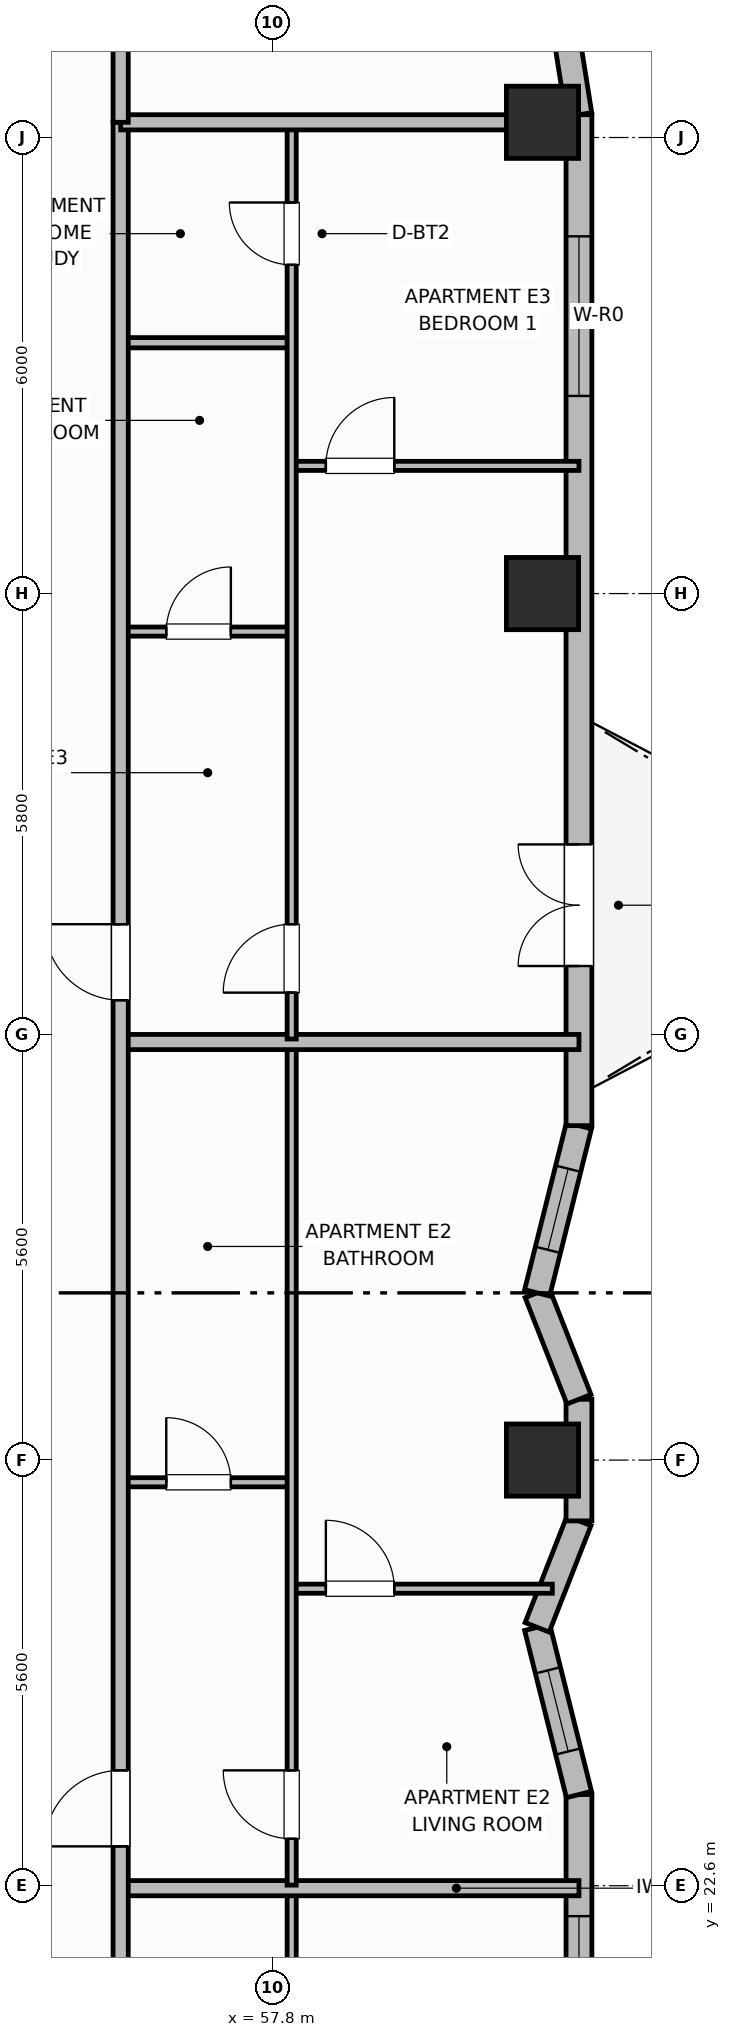
"""IFC4 building model, lengths in metres.
Left out: names, types, materials, properties, quantities, classifications, styles, units other than length and angle.
Written with IfcOpenShell. Run it as: python <this file> out.ifc"""

import sys

from ifc_helpers import new_model, si_unit, direction, frame, frame_2d, origin, origin_2d, place, context, subcontext, project, spatial, rectangle, extrude, element, fill, save


model = new_model("IFC4")
c1 = context("Model", 3, precision=1e-05, world=origin(), true_north=direction((0.0, 1.0)))
c2 = subcontext(c1, "Body", "Model", "MODEL_VIEW")
j1 = project(units=[si_unit("LENGTHUNIT", "METRE"), si_unit("PLANEANGLEUNIT", "RADIAN")], contexts=[c1])
p1 = place(None, origin())
s1 = spatial("IfcSite", under=j1, at=p1, CompositionType="ELEMENT")
p2 = place(p1, origin())
s2 = spatial("IfcBuilding", under=s1, at=p2, CompositionType="ELEMENT")
p3 = place(p2, frame((0.0, 0.0, 151.5)))
s3 = spatial("IfcBuildingStorey", under=s2, at=p3, CompositionType="ELEMENT", Elevation=151.5)
for number, where, z_axis, x_axis in (
    (1, (61.35, 28.2, 0.0), (0.0, 0.0, 1.0), (1.0, 0.0, 0.0)),
    (2, (61.35, 39.6, 0.0), (0.0, 0.0, 1.0), (1.0, 0.0, 0.0)),
    (3, (61.35, 45.8, 0.0), (0.0, 0.0, 1.0), (1.0, 0.0, 0.0)),
):
    element("IfcColumn", number, at=place(p3, frame(where, z_axis=z_axis, x_axis=x_axis)), inside=s3, PredefinedType="COLUMN", context=c2, shape_type="SweptSolid", body=[
        extrude(rectangle(XDim=0.95, YDim=0.95, at=origin_2d()), origin(), (0.0, 0.0, 1.0), 3.7),
    ])
p4 = place(p3, frame((61.83, 10.5, 0.0), z_axis=(0.0, 0.0, 1.0), x_axis=(0.0, 1.0, 0.0)))
e4 = element("IfcWall", 4, at=p4, inside=s3, PredefinedType="SOLIDWALL", context=c2, shape_type="SweptSolid", body=[
    extrude(rectangle(XDim=13.3, YDim=0.34, at=frame_2d((6.65, 0.0))), origin(), (0.0, 0.0, 1.0), 2.72),
])
p5 = place(p4, frame((1.6, 0.0, 0.95)))
e5 = element("IfcOpeningElement", 5, at=p5, cuts=e4, PredefinedType="OPENING", context=c2, shape_type="SweptSolid", body=[
    extrude(rectangle(XDim=1.1, YDim=1.65, at=frame_2d((0.55, 0.825))), frame((0.0, 0.18, 0.0), z_axis=(0.0, -1.0, 0.0), x_axis=(1.0, 0.0, 0.0)), (0.0, 0.0, 1.0), 0.36),
])
p6 = place(p4, frame((7.6, 0.0, 0.95)))
e6 = element("IfcOpeningElement", 6, at=p6, cuts=e4, PredefinedType="OPENING", context=c2, shape_type="SweptSolid", body=[
    extrude(rectangle(XDim=1.1, YDim=1.65, at=frame_2d((0.55, 0.825))), frame((0.0, 0.18, 0.0), z_axis=(0.0, -1.0, 0.0), x_axis=(1.0, 0.0, 0.0)), (0.0, 0.0, 1.0), 0.36),
])
p7 = place(p4, frame((10.6, 0.0, 0.95)))
e7 = element("IfcOpeningElement", 7, at=p7, cuts=e4, PredefinedType="OPENING", context=c2, shape_type="SweptSolid", body=[
    extrude(rectangle(XDim=1.1, YDim=1.65, at=frame_2d((0.55, 0.825))), frame((0.0, 0.18, 0.0), z_axis=(0.0, -1.0, 0.0), x_axis=(1.0, 0.0, 0.0)), (0.0, 0.0, 1.0), 0.36),
])
p8 = place(p3, frame((61.83, 23.8, 0.0), z_axis=(0.0, 0.0, 1.0), x_axis=(-0.242560957029, 0.970136166796, 0.0)))
e8 = element("IfcWall", 8, at=p8, inside=s3, PredefinedType="SOLIDWALL", context=c2, shape_type="SweptSolid", body=[
    extrude(rectangle(XDim=2.268, YDim=0.34, at=frame_2d((1.134, 0.0))), origin(), (0.0, 0.0, 1.0), 2.72),
])
p9 = place(p8, frame((0.584, 0.0, 0.91)))
e9 = element("IfcOpeningElement", 9, at=p9, cuts=e8, PredefinedType="OPENING", context=c2, shape_type="SweptSolid", body=[
    extrude(rectangle(XDim=1.1, YDim=1.65, at=frame_2d((0.55, 0.825))), frame((0.0, 0.18, 0.0), z_axis=(0.0, -1.0, 0.0), x_axis=(1.0, 0.0, 0.0)), (0.0, 0.0, 1.0), 0.36),
])
p10 = place(p3, frame((61.28, 26.0, 0.0), z_axis=(0.0, 0.0, 1.0), x_axis=(0.365702591843, 0.930731762818, 0.0)))
e10 = element("IfcWall", 10, at=p10, inside=s3, PredefinedType="SOLIDWALL", context=c2, shape_type="SweptSolid", body=[
    extrude(rectangle(XDim=1.504, YDim=0.34, at=frame_2d((0.752, 0.0))), origin(), (0.0, 0.0, 1.0), 2.72),
])
p11 = place(p3, frame((61.83, 27.4, 0.0), z_axis=(0.0, 0.0, 1.0), x_axis=(0.0, 1.0, 0.0)))
e11 = element("IfcWall", 11, at=p11, inside=s3, PredefinedType="SOLIDWALL", context=c2, shape_type="SweptSolid", body=[
    extrude(rectangle(XDim=1.6, YDim=0.34, at=frame_2d((0.8, 0.0))), origin(), (0.0, 0.0, 1.0), 2.72),
])
p12 = place(p3, frame((61.83, 29.0, 0.0), z_axis=(0.0, 0.0, 1.0), x_axis=(-0.365702591843, 0.930731762818, 0.0)))
e12 = element("IfcWall", 12, at=p12, inside=s3, PredefinedType="SOLIDWALL", context=c2, shape_type="SweptSolid", body=[
    extrude(rectangle(XDim=1.504, YDim=0.34, at=frame_2d((0.752, 0.0))), origin(), (0.0, 0.0, 1.0), 2.72),
])
p13 = place(p3, frame((61.28, 30.4, 0.0), z_axis=(0.0, 0.0, 1.0), x_axis=(0.242535625036, 0.970142500145, 0.0)))
e13 = element("IfcWall", 13, at=p13, inside=s3, PredefinedType="SOLIDWALL", context=c2, shape_type="SweptSolid", body=[
    extrude(rectangle(XDim=2.268, YDim=0.34, at=frame_2d((1.134, 0.0))), origin(), (0.0, 0.0, 1.0), 2.72),
])
p14 = place(p13, frame((0.584, 0.0, 0.91)))
e14 = element("IfcOpeningElement", 14, at=p14, cuts=e13, PredefinedType="OPENING", context=c2, shape_type="SweptSolid", body=[
    extrude(rectangle(XDim=1.1, YDim=1.65, at=frame_2d((0.55, 0.825))), frame((0.0, 0.18, 0.0), z_axis=(0.0, -1.0, 0.0), x_axis=(1.0, 0.0, 0.0)), (0.0, 0.0, 1.0), 0.36),
])
p15 = place(p3, frame((61.83, 32.6, 0.0), z_axis=(0.0, 0.0, 1.0), x_axis=(0.0, 1.0, 0.0)))
e15 = element("IfcWall", 15, at=p15, inside=s3, PredefinedType="SOLIDWALL", context=c2, shape_type="SweptSolid", body=[
    extrude(rectangle(XDim=13.3, YDim=0.34, at=frame_2d((6.65, 0.0))), origin(), (0.0, 0.0, 1.0), 2.72),
])
p16 = place(p15, frame((2.1, 0.0, 0.0)))
e16 = element("IfcOpeningElement", 16, at=p16, cuts=e15, PredefinedType="OPENING", context=c2, shape_type="SweptSolid", body=[
    extrude(rectangle(XDim=1.6, YDim=2.1, at=frame_2d((0.8, 1.05))), frame((0.0, 0.18, 0.0), z_axis=(0.0, -1.0, 0.0), x_axis=(1.0, 0.0, 0.0)), (0.0, 0.0, 1.0), 0.36),
])
p17 = place(p15, frame((9.6, 0.0, 0.7)))
e17 = element("IfcOpeningElement", 17, at=p17, cuts=e15, PredefinedType="OPENING", context=c2, shape_type="SweptSolid", body=[
    extrude(rectangle(XDim=2.1, YDim=1.9, at=frame_2d((1.05, 0.95))), frame((0.0, 0.18, 0.0), z_axis=(0.0, -1.0, 0.0), x_axis=(1.0, 0.0, 0.0)), (0.0, 0.0, 1.0), 0.36),
])
p18 = place(p3, frame((61.83, 45.9, 0.0), z_axis=(0.0, 0.0, 1.0), x_axis=(-0.156481329164, 0.987680916907, 0.0)))
e18 = element("IfcWall", 18, at=p18, inside=s3, PredefinedType="SOLIDWALL", context=c2, shape_type="SweptSolid", body=[
    extrude(rectangle(XDim=1.136, YDim=0.34, at=frame_2d((0.568, 0.0))), origin(), (0.0, 0.0, 1.0), 2.72),
])
p19 = place(p3, frame((58.05, 10.64, 0.0), z_axis=(0.0, 0.0, 1.0), x_axis=(0.0, 1.0, 0.0)))
e19 = element("IfcWall", 19, at=p19, inside=s3, PredefinedType="PARTITIONING", context=c2, shape_type="SweptSolid", body=[
    extrude(rectangle(XDim=11.888, YDim=0.12, at=frame_2d((5.944, 0.0))), origin(), (0.0, 0.0, 1.0), 2.55),
])
p20 = place(p19, frame((0.41, 0.0, 0.0)))
e20 = element("IfcOpeningElement", 20, at=p20, cuts=e19, PredefinedType="OPENING", context=c2, shape_type="SweptSolid", body=[
    extrude(rectangle(XDim=0.9, YDim=2.1, at=frame_2d((0.45, 1.05))), frame((0.0, 0.07, 0.0), z_axis=(0.0, -1.0, 0.0), x_axis=(1.0, 0.0, 0.0)), (0.0, 0.0, 1.0), 0.14),
])
p21 = place(p19, frame((10.119, 0.0, 0.0)))
e21 = element("IfcOpeningElement", 21, at=p21, cuts=e19, PredefinedType="OPENING", context=c2, shape_type="SweptSolid", body=[
    extrude(rectangle(XDim=0.82, YDim=2.08, at=frame_2d((0.41, 1.04))), frame((0.0, 0.07, 0.0), z_axis=(0.0, -1.0, 0.0), x_axis=(1.0, 0.0, 0.0)), (0.0, 0.0, 1.0), 0.14),
])
p22 = place(p3, frame((55.8, 22.568, 0.0), z_axis=(0.0, 0.0, 1.0), x_axis=(1.0, 0.0, 0.0)))
e22 = element("IfcWall", 22, at=p22, inside=s3, PredefinedType="PARTITIONING", context=c2, shape_type="SweptSolid", body=[
    extrude(rectangle(XDim=6.03, YDim=0.2, at=frame_2d((3.015, 0.0))), origin(), (0.0, 0.0, 1.0), 2.55),
])
p23 = place(p3, frame((55.8, 27.908, 0.0), z_axis=(0.0, 0.0, 1.0), x_axis=(1.0, 0.0, 0.0)))
e23 = element("IfcWall", 23, at=p23, inside=s3, PredefinedType="PARTITIONING", context=c2, shape_type="SweptSolid", body=[
    extrude(rectangle(XDim=2.25, YDim=0.12, at=frame_2d((1.125, 0.0))), origin(), (0.0, 0.0, 1.0), 2.55),
])
p24 = place(p23, frame((0.6, 0.0, 0.0)))
e24 = element("IfcOpeningElement", 24, at=p24, cuts=e23, PredefinedType="OPENING", context=c2, shape_type="SweptSolid", body=[
    extrude(rectangle(XDim=0.85, YDim=2.1, at=frame_2d((0.425, 1.05))), frame((0.0, 0.07, 0.0), z_axis=(0.0, -1.0, 0.0), x_axis=(1.0, 0.0, 0.0)), (0.0, 0.0, 1.0), 0.14),
])
p25 = place(p3, frame((58.05, 26.508, 0.0), z_axis=(0.0, 0.0, 1.0), x_axis=(1.0, 0.0, 0.0)))
e25 = element("IfcWall", 25, at=p25, inside=s3, PredefinedType="PARTITIONING", context=c2, shape_type="SweptSolid", body=[
    extrude(rectangle(XDim=3.429, YDim=0.12, at=frame_2d((1.715, 0.0))), origin(), (0.0, 0.0, 1.0), 2.55),
])
p26 = place(p25, frame((0.45, 0.0, 0.0)))
e26 = element("IfcOpeningElement", 26, at=p26, cuts=e25, PredefinedType="OPENING", context=c2, shape_type="SweptSolid", body=[
    extrude(rectangle(XDim=0.9, YDim=2.1, at=frame_2d((0.45, 1.05))), frame((0.0, 0.07, 0.0), z_axis=(0.0, -1.0, 0.0), x_axis=(1.0, 0.0, 0.0)), (0.0, 0.0, 1.0), 0.14),
])
p27 = place(p3, frame((58.05, 22.608, 0.0), z_axis=(0.0, 0.0, 1.0), x_axis=(0.0, 1.0, 0.0)))
e27 = element("IfcWall", 27, at=p27, inside=s3, PredefinedType="PARTITIONING", context=c2, shape_type="SweptSolid", body=[
    extrude(rectangle(XDim=11.052, YDim=0.12, at=frame_2d((5.526, 0.0))), origin(), (0.0, 0.0, 1.0), 2.55),
])
p28 = place(p27, frame((0.61, 0.0, 0.0)))
e28 = element("IfcOpeningElement", 28, at=p28, cuts=e27, PredefinedType="OPENING", context=c2, shape_type="SweptSolid", body=[
    extrude(rectangle(XDim=0.9, YDim=2.1, at=frame_2d((0.45, 1.05))), frame((0.0, 0.07, 0.0), z_axis=(0.0, -1.0, 0.0), x_axis=(1.0, 0.0, 0.0)), (0.0, 0.0, 1.0), 0.14),
])
p29 = place(p3, frame((55.8, 33.7, 0.0), z_axis=(0.0, 0.0, 1.0), x_axis=(1.0, 0.0, 0.0)))
e29 = element("IfcWall", 29, at=p29, inside=s3, PredefinedType="PARTITIONING", context=c2, shape_type="SweptSolid", body=[
    extrude(rectangle(XDim=6.03, YDim=0.2, at=frame_2d((3.015, 0.0))), origin(), (0.0, 0.0, 1.0), 2.55),
])
p30 = place(p3, frame((55.8, 39.1, 0.0), z_axis=(0.0, 0.0, 1.0), x_axis=(1.0, 0.0, 0.0)))
e30 = element("IfcWall", 30, at=p30, inside=s3, PredefinedType="PARTITIONING", context=c2, shape_type="SweptSolid", body=[
    extrude(rectangle(XDim=2.25, YDim=0.12, at=frame_2d((1.125, 0.0))), origin(), (0.0, 0.0, 1.0), 2.55),
])
p31 = place(p30, frame((0.6, 0.0, 0.0)))
e31 = element("IfcOpeningElement", 31, at=p31, cuts=e30, PredefinedType="OPENING", context=c2, shape_type="SweptSolid", body=[
    extrude(rectangle(XDim=0.85, YDim=2.1, at=frame_2d((0.425, 1.05))), frame((0.0, 0.07, 0.0), z_axis=(0.0, -1.0, 0.0), x_axis=(1.0, 0.0, 0.0)), (0.0, 0.0, 1.0), 0.14),
])
p32 = place(p3, frame((55.8, 42.9, 0.0), z_axis=(0.0, 0.0, 1.0), x_axis=(1.0, 0.0, 0.0)))
e32 = element("IfcWall", 32, at=p32, inside=s3, PredefinedType="PARTITIONING", context=c2, shape_type="SweptSolid", body=[
    extrude(rectangle(XDim=2.25, YDim=0.135, at=frame_2d((1.125, 0.0))), origin(), (0.0, 0.0, 1.0), 2.55),
])
p33 = place(p3, frame((58.05, 41.28, 0.0), z_axis=(0.0, 0.0, 1.0), x_axis=(1.0, 0.0, 0.0)))
e33 = element("IfcWall", 33, at=p33, inside=s3, PredefinedType="PARTITIONING", context=c2, shape_type="SweptSolid", body=[
    extrude(rectangle(XDim=3.78, YDim=0.12, at=frame_2d((1.89, 0.0))), origin(), (0.0, 0.0, 1.0), 2.55),
])
p34 = place(p33, frame((0.45, 0.0, 0.0)))
e34 = element("IfcOpeningElement", 34, at=p34, cuts=e33, PredefinedType="OPENING", context=c2, shape_type="SweptSolid", body=[
    extrude(rectangle(XDim=0.9, YDim=2.1, at=frame_2d((0.45, 1.05))), frame((0.0, 0.07, 0.0), z_axis=(0.0, -1.0, 0.0), x_axis=(1.0, 0.0, 0.0)), (0.0, 0.0, 1.0), 0.14),
])
p35 = place(p3, frame((58.05, 33.74, 0.0), z_axis=(0.0, 0.0, 1.0), x_axis=(0.0, 1.0, 0.0)))
e35 = element("IfcWall", 35, at=p35, inside=s3, PredefinedType="PARTITIONING", context=c2, shape_type="SweptSolid", body=[
    extrude(rectangle(XDim=12.02, YDim=0.12, at=frame_2d((6.01, 0.0))), origin(), (0.0, 0.0, 1.0), 2.55),
])
p36 = place(p35, frame((0.61, 0.0, 0.0)))
e36 = element("IfcOpeningElement", 36, at=p36, cuts=e35, PredefinedType="OPENING", context=c2, shape_type="SweptSolid", body=[
    extrude(rectangle(XDim=0.9, YDim=2.1, at=frame_2d((0.45, 1.05))), frame((0.0, 0.07, 0.0), z_axis=(0.0, -1.0, 0.0), x_axis=(1.0, 0.0, 0.0)), (0.0, 0.0, 1.0), 0.14),
])
p37 = place(p35, frame((10.185, 0.0, 0.0)))
e37 = element("IfcOpeningElement", 37, at=p37, cuts=e35, PredefinedType="OPENING", context=c2, shape_type="SweptSolid", body=[
    extrude(rectangle(XDim=0.82, YDim=2.08, at=frame_2d((0.41, 1.04))), frame((0.0, 0.07, 0.0), z_axis=(0.0, -1.0, 0.0), x_axis=(1.0, 0.0, 0.0)), (0.0, 0.0, 1.0), 0.14),
])
p38 = place(p3, frame((55.8, 10.6, 0.0), z_axis=(0.0, 0.0, 1.0), x_axis=(0.0, 1.0, 0.0)))
e38 = element("IfcWall", 38, at=p38, inside=s3, PredefinedType="PARTITIONING", context=c2, shape_type="SweptSolid", body=[
    extrude(rectangle(XDim=35.2, YDim=0.2, at=frame_2d((17.6, 0.0))), origin(), (0.0, 0.0, 1.0), 2.55),
])
p39 = place(p38, frame((2.65, 0.0, 0.0)))
e39 = element("IfcOpeningElement", 39, at=p39, cuts=e38, PredefinedType="OPENING", context=c2, shape_type="SweptSolid", body=[
    extrude(rectangle(XDim=1.0, YDim=2.15, at=frame_2d((0.5, 1.075))), frame((0.0, 0.11, 0.0), z_axis=(0.0, -1.0, 0.0), x_axis=(1.0, 0.0, 0.0)), (0.0, 0.0, 1.0), 0.22),
])
p40 = place(p38, frame((12.518, 0.0, 0.0)))
e40 = element("IfcOpeningElement", 40, at=p40, cuts=e38, PredefinedType="OPENING", context=c2, shape_type="SweptSolid", body=[
    extrude(rectangle(XDim=1.0, YDim=2.15, at=frame_2d((0.5, 1.075))), frame((0.0, 0.11, 0.0), z_axis=(0.0, -1.0, 0.0), x_axis=(1.0, 0.0, 0.0)), (0.0, 0.0, 1.0), 0.22),
])
p41 = place(p38, frame((23.65, 0.0, 0.0)))
e41 = element("IfcOpeningElement", 41, at=p41, cuts=e38, PredefinedType="OPENING", context=c2, shape_type="SweptSolid", body=[
    extrude(rectangle(XDim=1.0, YDim=2.15, at=frame_2d((0.5, 1.075))), frame((0.0, 0.11, 0.0), z_axis=(0.0, -1.0, 0.0), x_axis=(1.0, 0.0, 0.0)), (0.0, 0.0, 1.0), 0.22),
])
p42 = place(p3, frame((55.8, 45.8, 0.0), z_axis=(0.0, 0.0, 1.0), x_axis=(1.0, 0.0, 0.0)))
e42 = element("IfcWall", 42, at=p42, inside=s3, PredefinedType="PARTITIONING", context=c2, shape_type="SweptSolid", body=[
    extrude(rectangle(XDim=5.61, YDim=0.2, at=frame_2d((2.805, 0.0))), origin(), (0.0, 0.0, 1.0), 2.55),
])
p43 = place(p3, frame((55.8, 45.8, 0.0), z_axis=(0.0, 0.0, 1.0), x_axis=(0.0, 1.0, 0.0)))
e43 = element("IfcWall", 43, at=p43, inside=s3, PredefinedType="PARTITIONING", context=c2, shape_type="SweptSolid", body=[
    extrude(rectangle(XDim=3.73, YDim=0.2, at=frame_2d((1.865, 0.0))), origin(), (0.0, 0.0, 1.0), 2.55),
])
p44 = place(p7, origin())
e44 = element("IfcWindow", 44, at=p44, inside=s3, PartitioningType="SINGLE_PANEL", PredefinedType="WINDOW", context=c2, shape_type="SweptSolid", body=[
    extrude(rectangle(XDim=1.1, YDim=1.65, at=frame_2d((0.55, 0.825))), frame((0.0, 0.03, 0.0), z_axis=(0.0, -1.0, 0.0), x_axis=(1.0, 0.0, 0.0)), (0.0, 0.0, 1.0), 0.06),
])
fill(e7, e44)
p45 = place(p9, origin())
e45 = element("IfcWindow", 45, at=p45, inside=s3, PartitioningType="SINGLE_PANEL", PredefinedType="WINDOW", context=c2, shape_type="SweptSolid", body=[
    extrude(rectangle(XDim=1.1, YDim=1.65, at=frame_2d((0.55, 0.825))), frame((0.0, 0.03, 0.0), z_axis=(0.0, -1.0, 0.0), x_axis=(1.0, 0.0, 0.0)), (0.0, 0.0, 1.0), 0.06),
])
fill(e9, e45)
p46 = place(p14, origin())
e46 = element("IfcWindow", 46, at=p46, inside=s3, PartitioningType="SINGLE_PANEL", PredefinedType="WINDOW", context=c2, shape_type="SweptSolid", body=[
    extrude(rectangle(XDim=1.1, YDim=1.65, at=frame_2d((0.55, 0.825))), frame((0.0, 0.03, 0.0), z_axis=(0.0, -1.0, 0.0), x_axis=(1.0, 0.0, 0.0)), (0.0, 0.0, 1.0), 0.06),
])
fill(e14, e46)
p47 = place(p16, origin())
e47 = element("IfcDoor", 47, at=p47, inside=s3, OperationType="DOUBLE_DOOR_SINGLE_SWING", PredefinedType="DOOR", context=c2, shape_type="SweptSolid", body=[
    extrude(rectangle(XDim=1.6, YDim=2.1, at=frame_2d((0.8, 1.05))), frame((0.0, 0.025, 0.0), z_axis=(0.0, -1.0, 0.0), x_axis=(1.0, 0.0, 0.0)), (0.0, 0.0, 1.0), 0.05),
])
fill(e16, e47)
p48 = place(p17, origin())
e48 = element("IfcWindow", 48, at=p48, inside=s3, PartitioningType="SINGLE_PANEL", PredefinedType="WINDOW", context=c2, shape_type="SweptSolid", body=[
    extrude(rectangle(XDim=2.1, YDim=1.9, at=frame_2d((1.05, 0.95))), frame((0.0, 0.03, 0.0), z_axis=(0.0, -1.0, 0.0), x_axis=(1.0, 0.0, 0.0)), (0.0, 0.0, 1.0), 0.06),
])
fill(e17, e48)
p49 = place(p24, origin())
e49 = element("IfcDoor", 49, at=p49, inside=s3, OperationType="SINGLE_SWING_LEFT", PredefinedType="DOOR", context=c2, shape_type="SweptSolid", body=[
    extrude(rectangle(XDim=0.85, YDim=2.1, at=frame_2d((0.425, 1.05))), frame((0.0, 0.025, 0.0), z_axis=(0.0, -1.0, 0.0), x_axis=(1.0, 0.0, 0.0)), (0.0, 0.0, 1.0), 0.05),
])
fill(e24, e49)
p50 = place(p26, origin())
e50 = element("IfcDoor", 50, at=p50, inside=s3, OperationType="SINGLE_SWING_LEFT", PredefinedType="DOOR", context=c2, shape_type="SweptSolid", body=[
    extrude(rectangle(XDim=0.9, YDim=2.1, at=frame_2d((0.45, 1.05))), frame((0.0, 0.025, 0.0), z_axis=(0.0, -1.0, 0.0), x_axis=(1.0, 0.0, 0.0)), (0.0, 0.0, 1.0), 0.05),
])
fill(e26, e50)
p51 = place(p28, origin())
e51 = element("IfcDoor", 51, at=p51, inside=s3, OperationType="SINGLE_SWING_RIGHT", PredefinedType="DOOR", context=c2, shape_type="SweptSolid", body=[
    extrude(rectangle(XDim=0.9, YDim=2.1, at=frame_2d((0.45, 1.05))), frame((0.0, 0.025, 0.0), z_axis=(0.0, -1.0, 0.0), x_axis=(1.0, 0.0, 0.0)), (0.0, 0.0, 1.0), 0.05),
])
fill(e28, e51)
p52 = place(p31, origin())
e52 = element("IfcDoor", 52, at=p52, inside=s3, OperationType="SINGLE_SWING_RIGHT", PredefinedType="DOOR", context=c2, shape_type="SweptSolid", body=[
    extrude(rectangle(XDim=0.85, YDim=2.1, at=frame_2d((0.425, 1.05))), frame((0.0, 0.025, 0.0), z_axis=(0.0, -1.0, 0.0), x_axis=(1.0, 0.0, 0.0)), (0.0, 0.0, 1.0), 0.05),
])
fill(e31, e52)
p53 = place(p34, origin())
e53 = element("IfcDoor", 53, at=p53, inside=s3, OperationType="SINGLE_SWING_RIGHT", PredefinedType="DOOR", context=c2, shape_type="SweptSolid", body=[
    extrude(rectangle(XDim=0.9, YDim=2.1, at=frame_2d((0.45, 1.05))), frame((0.0, 0.025, 0.0), z_axis=(0.0, -1.0, 0.0), x_axis=(1.0, 0.0, 0.0)), (0.0, 0.0, 1.0), 0.05),
])
fill(e34, e53)
p54 = place(p36, origin())
e54 = element("IfcDoor", 54, at=p54, inside=s3, OperationType="SINGLE_SWING_LEFT", PredefinedType="DOOR", context=c2, shape_type="SweptSolid", body=[
    extrude(rectangle(XDim=0.9, YDim=2.1, at=frame_2d((0.45, 1.05))), frame((0.0, 0.025, 0.0), z_axis=(0.0, -1.0, 0.0), x_axis=(1.0, 0.0, 0.0)), (0.0, 0.0, 1.0), 0.05),
])
fill(e36, e54)
p55 = place(p37, origin())
e55 = element("IfcDoor", 55, at=p55, inside=s3, OperationType="SINGLE_SWING_RIGHT", PredefinedType="DOOR", context=c2, shape_type="SweptSolid", body=[
    extrude(rectangle(XDim=0.82, YDim=2.08, at=frame_2d((0.41, 1.04))), frame((0.0, 0.025, 0.0), z_axis=(0.0, -1.0, 0.0), x_axis=(1.0, 0.0, 0.0)), (0.0, 0.0, 1.0), 0.05),
])
fill(e37, e55)
p56 = place(p40, origin())
e56 = element("IfcDoor", 56, at=p56, inside=s3, OperationType="SINGLE_SWING_LEFT", PredefinedType="DOOR", context=c2, shape_type="SweptSolid", body=[
    extrude(rectangle(XDim=1.0, YDim=2.15, at=frame_2d((0.5, 1.075))), frame((0.0, 0.025, 0.0), z_axis=(0.0, -1.0, 0.0), x_axis=(1.0, 0.0, 0.0)), (0.0, 0.0, 1.0), 0.05),
])
fill(e40, e56)
p57 = place(p41, origin())
e57 = element("IfcDoor", 57, at=p57, inside=s3, OperationType="SINGLE_SWING_RIGHT", PredefinedType="DOOR", context=c2, shape_type="SweptSolid", body=[
    extrude(rectangle(XDim=1.0, YDim=2.15, at=frame_2d((0.5, 1.075))), frame((0.0, 0.025, 0.0), z_axis=(0.0, -1.0, 0.0), x_axis=(1.0, 0.0, 0.0)), (0.0, 0.0, 1.0), 0.05),
])
fill(e41, e57)
save(model, sys.argv[1])
